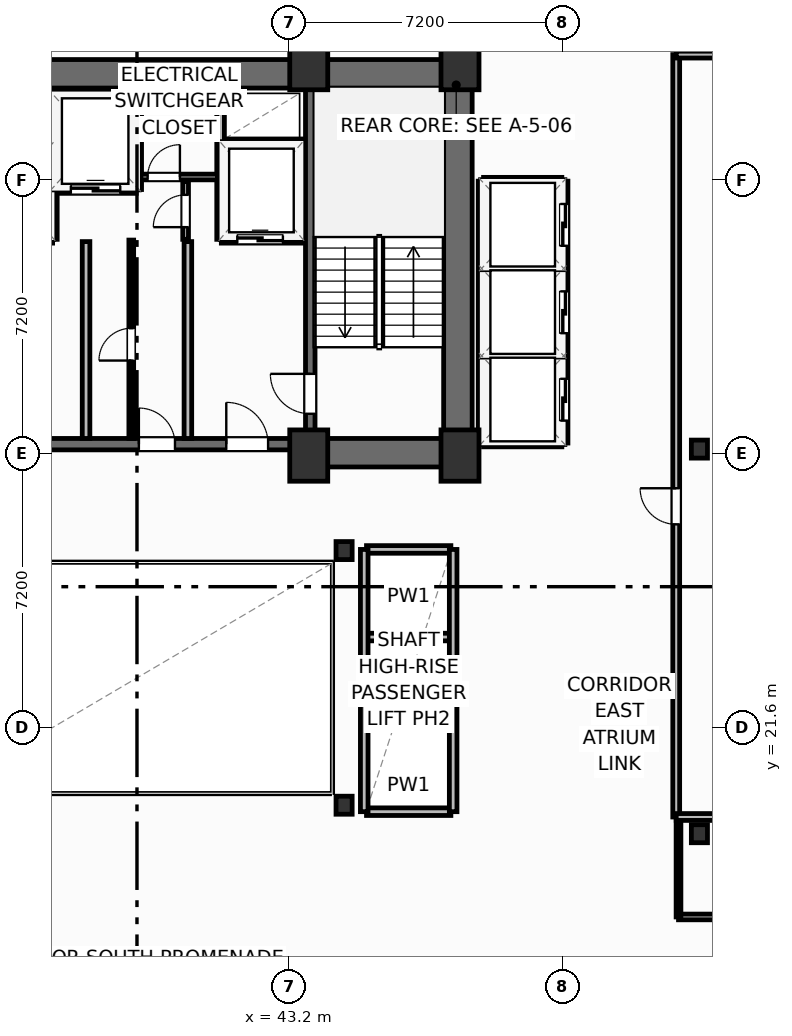
"""IFC4 building model, lengths in metres.
Left out: names, types, materials, properties, quantities, classifications, styles, units other than length and angle.
Written with IfcOpenShell. Run it as: python <this file> out.ifc"""

import sys

from ifc_helpers import new_model, si_unit, direction, frame, frame_2d, origin, origin_2d, place, context, subcontext, project, spatial, rectangle, i_section, extrude, element, fill, save


model = new_model("IFC4")
c1 = context("Model", 3, precision=1e-05, world=origin(), true_north=direction((0.0, 1.0)))
c2 = subcontext(c1, "Body", "Model", "MODEL_VIEW")
j1 = project(units=[si_unit("LENGTHUNIT", "METRE"), si_unit("PLANEANGLEUNIT", "RADIAN")], contexts=[c1])
p1 = place(None, origin())
s1 = spatial("IfcSite", under=j1, at=p1, CompositionType="ELEMENT")
p2 = place(p1, origin())
s2 = spatial("IfcBuilding", under=s1, at=p2, CompositionType="ELEMENT")
p3 = place(p2, frame((0.0, 0.0, 140.2)))
s3 = spatial("IfcBuildingStorey", under=s2, at=p3, CompositionType="ELEMENT", Elevation=140.2)
for number, where, z_axis, x_axis in (
    (1, (43.72, 28.75, 0.0), (0.0, 0.0, 1.0), (1.0, 0.0, 0.0)),
    (2, (47.7, 28.75, 0.0), (0.0, 0.0, 1.0), (1.0, 0.0, 0.0)),
    (3, (43.72, 39.05, 0.0), (0.0, 0.0, 1.0), (1.0, 0.0, 0.0)),
    (4, (47.7, 39.05, 0.0), (0.0, 0.0, 1.0), (1.0, 0.0, 0.0)),
):
    element("IfcColumn", number, at=place(p3, frame(where, z_axis=z_axis, x_axis=x_axis)), inside=s3, PredefinedType="COLUMN", context=c2, shape_type="SweptSolid", body=[
        extrude(rectangle(XDim=1.0, YDim=1.35, at=origin_2d()), origin(), (0.0, 0.0, 1.0), 3.7),
    ])
for number, where, z_axis, x_axis in (
    (5, (44.65, 19.55, 0.0), (0.0, 0.0, 1.0), (1.0, 0.0, 0.0)),
    (6, (44.65, 26.25, 0.0), (0.0, 0.0, 1.0), (1.0, 0.0, 0.0)),
    (7, (54.0, 18.8, 0.0), (0.0, 0.0, 1.0), (1.0, 0.0, 0.0)),
    (8, (54.0, 28.92, 0.0), (0.0, 0.0, 1.0), (1.0, 0.0, 0.0)),
):
    element("IfcColumn", number, at=place(p3, frame(where, z_axis=z_axis, x_axis=x_axis)), inside=s3, PredefinedType="COLUMN", context=c2, shape_type="SweptSolid", body=[
        extrude(i_section(OverallWidth=0.424, OverallDepth=0.474, WebThickness=0.048, FlangeThickness=0.077, FilletRadius=0.025, at=origin_2d()), origin(), (0.0, 0.0, 1.0), 3.7),
    ])
p4 = place(p3, frame((30.38, 38.795, 0.0), z_axis=(0.0, 0.0, 1.0), x_axis=(1.0, 0.0, 0.0)))
e9 = element("IfcWall", 9, at=p4, inside=s3, PredefinedType="SHEAR", context=c2, shape_type="SweptSolid", body=[
    extrude(rectangle(XDim=17.64, YDim=0.75, at=frame_2d((8.82, 0.0))), origin(), (0.0, 0.0, 1.0), 3.45),
])
p5 = place(p3, frame((47.645, 29.2, 0.0), z_axis=(0.0, 0.0, 1.0), x_axis=(0.0, 1.0, 0.0)))
e10 = element("IfcWall", 10, at=p5, inside=s3, PredefinedType="SHEAR", context=c2, shape_type="SweptSolid", body=[
    extrude(rectangle(XDim=9.22, YDim=0.75, at=frame_2d((4.61, 0.0))), origin(), (0.0, 0.0, 1.0), 3.45),
])
p6 = place(p3, frame((43.6, 28.825, 0.0), z_axis=(0.0, 0.0, 1.0), x_axis=(1.0, 0.0, 0.0)))
e11 = element("IfcWall", 11, at=p6, inside=s3, PredefinedType="SHEAR", context=c2, shape_type="SweptSolid", body=[
    extrude(rectangle(XDim=4.42, YDim=0.75, at=frame_2d((2.21, 0.0))), origin(), (0.0, 0.0, 1.0), 3.45),
])
p7 = place(p3, frame((34.8, 29.05, 0.0), z_axis=(0.0, 0.0, 1.0), x_axis=(1.0, 0.0, 0.0)))
e12 = element("IfcWall", 12, at=p7, inside=s3, PredefinedType="SHEAR", context=c2, shape_type="SweptSolid", body=[
    extrude(rectangle(XDim=8.8, YDim=0.3, at=frame_2d((4.4, 0.0))), origin(), (0.0, 0.0, 1.0), 3.45),
])
p8 = place(p7, frame((0.95, 0.0, 0.0)))
e13 = element("IfcOpeningElement", 13, at=p8, cuts=e12, PredefinedType="OPENING", context=c2, shape_type="SweptSolid", body=[
    extrude(rectangle(XDim=1.1, YDim=2.15, at=frame_2d((0.55, 1.075))), frame((0.0, 0.16, 0.0), z_axis=(0.0, -1.0, 0.0), x_axis=(1.0, 0.0, 0.0)), (0.0, 0.0, 1.0), 0.32),
])
p9 = place(p7, frame((6.75, 0.0, 0.0)))
e14 = element("IfcOpeningElement", 14, at=p9, cuts=e12, PredefinedType="OPENING", context=c2, shape_type="SweptSolid", body=[
    extrude(rectangle(XDim=1.1, YDim=2.15, at=frame_2d((0.55, 1.075))), frame((0.0, 0.16, 0.0), z_axis=(0.0, -1.0, 0.0), x_axis=(1.0, 0.0, 0.0)), (0.0, 0.0, 1.0), 0.32),
])
p10 = place(p7, frame((4.45, 0.0, 0.0)))
e15 = element("IfcOpeningElement", 15, at=p10, cuts=e12, PredefinedType="OPENING", context=c2, shape_type="SweptSolid", body=[
    extrude(rectangle(XDim=0.95, YDim=2.15, at=frame_2d((0.475, 1.075))), frame((0.0, 0.16, 0.0), z_axis=(0.0, -1.0, 0.0), x_axis=(1.0, 0.0, 0.0)), (0.0, 0.0, 1.0), 0.32),
])
p11 = place(p3, frame((43.76, 29.2, 0.0), z_axis=(0.0, 0.0, 1.0), x_axis=(0.0, 1.0, 0.0)))
e16 = element("IfcWall", 16, at=p11, inside=s3, PredefinedType="SHEAR", context=c2, shape_type="SweptSolid", body=[
    extrude(rectangle(XDim=9.22, YDim=0.25, at=frame_2d((4.61, 0.0))), origin(), (0.0, 0.0, 1.0), 3.45),
])
p12 = place(p11, frame((0.65, 0.0, 0.0)))
e17 = element("IfcOpeningElement", 17, at=p12, cuts=e16, PredefinedType="OPENING", context=c2, shape_type="SweptSolid", body=[
    extrude(rectangle(XDim=1.05, YDim=2.15, at=frame_2d((0.525, 1.075))), frame((0.0, 0.135, 0.0), z_axis=(0.0, -1.0, 0.0), x_axis=(1.0, 0.0, 0.0)), (0.0, 0.0, 1.0), 0.27),
])
p13 = place(p3, frame((53.45, 16.61, 0.0), z_axis=(0.0, 0.0, 1.0), x_axis=(1.0, 0.0, 0.0)))
e18 = element("IfcWall", 18, at=p13, inside=s3, PredefinedType="PARTITIONING", context=c2, shape_type="SweptSolid", body=[
    extrude(rectangle(XDim=16.55, YDim=0.15, at=frame_2d((8.275, 0.0))), origin(), (0.0, 0.0, 1.0), 3.45),
])
p14 = place(p13, frame((5.873, 0.0, 0.0)))
e19 = element("IfcOpeningElement", 19, at=p14, cuts=e18, PredefinedType="OPENING", context=c2, shape_type="SweptSolid", body=[
    extrude(rectangle(XDim=0.92, YDim=2.05, at=frame_2d((0.46, 1.025))), frame((0.0, 0.085, 0.0), z_axis=(0.0, -1.0, 0.0), x_axis=(1.0, 0.0, 0.0)), (0.0, 0.0, 1.0), 0.17),
])
p15 = place(p3, frame((53.45, 16.61, 0.0), z_axis=(0.0, 0.0, 1.0), x_axis=(0.0, 1.0, 0.0)))
e20 = element("IfcWall", 20, at=p15, inside=s3, PredefinedType="PARTITIONING", context=c2, shape_type="SweptSolid", body=[
    extrude(rectangle(XDim=2.63, YDim=0.125, at=frame_2d((1.315, 0.0))), origin(), (0.0, 0.0, 1.0), 3.45),
])
p16 = place(p3, frame((53.39, 19.24, 0.0), z_axis=(0.0, 0.0, 1.0), x_axis=(0.0, 1.0, 0.0)))
e21 = element("IfcWall", 21, at=p16, inside=s3, PredefinedType="PARTITIONING", context=c2, shape_type="SweptSolid", body=[
    extrude(rectangle(XDim=20.06, YDim=0.18, at=frame_2d((10.03, 0.0))), origin(), (0.0, 0.0, 1.0), 3.45),
])
p17 = place(p16, frame((7.7, 0.0, 0.0)))
e22 = element("IfcOpeningElement", 22, at=p17, cuts=e21, PredefinedType="OPENING", context=c2, shape_type="SweptSolid", body=[
    extrude(rectangle(XDim=0.95, YDim=2.05, at=frame_2d((0.475, 1.025))), frame((0.0, 0.1, 0.0), z_axis=(0.0, -1.0, 0.0), x_axis=(1.0, 0.0, 0.0)), (0.0, 0.0, 1.0), 0.2),
])
p18 = place(p3, frame((53.39, 19.24, 0.0), z_axis=(0.0, 0.0, 1.0), x_axis=(1.0, 0.0, 0.0)))
e23 = element("IfcWall", 23, at=p18, inside=s3, PredefinedType="PARTITIONING", context=c2, shape_type="SweptSolid", body=[
    extrude(rectangle(XDim=22.367, YDim=0.18, at=frame_2d((11.183, 0.0))), origin(), (0.0, 0.0, 1.0), 2.662),
])
p19 = place(p3, frame((53.39, 39.3, 0.0), z_axis=(0.0, 0.0, 1.0), x_axis=(1.0, 0.0, 0.0)))
e24 = element("IfcWall", 24, at=p19, inside=s3, PredefinedType="PARTITIONING", context=c2, shape_type="SweptSolid", body=[
    extrude(rectangle(XDim=24.74, YDim=0.18, at=frame_2d((12.37, 0.0))), origin(), (0.0, 0.0, 1.0), 3.45),
])
for number, where, z_axis, x_axis in (
    (25, (37.86, 29.2, 0.0), (0.0, 0.0, 1.0), (0.0, 1.0, 0.0)),
    (26, (40.54, 29.2, 0.0), (0.0, 0.0, 1.0), (0.0, 1.0, 0.0)),
):
    element("IfcWall", number, at=place(p3, frame(where, z_axis=z_axis, x_axis=x_axis)), inside=s3, PredefinedType="PARTITIONING", context=c2, shape_type="SweptSolid", body=[
        extrude(rectangle(XDim=5.18, YDim=0.2, at=frame_2d((2.59, 0.0))), origin(), (0.0, 0.0, 1.0), 3.45),
    ])
p20 = place(p3, frame((37.0, 34.44, 0.0), z_axis=(0.0, 0.0, 1.0), x_axis=(0.0, 1.0, 0.0)))
e27 = element("IfcWall", 27, at=p20, inside=s3, PredefinedType="PARTITIONING", context=c2, shape_type="SweptSolid", body=[
    extrude(rectangle(XDim=3.9, YDim=0.2, at=frame_2d((1.95, 0.0))), origin(), (0.0, 0.0, 1.0), 3.45),
])
p21 = place(p3, frame((41.42, 34.44, 0.0), z_axis=(0.0, 0.0, 1.0), x_axis=(1.0, 0.0, 0.0)))
e28 = element("IfcWall", 28, at=p21, inside=s3, PredefinedType="PARTITIONING", context=c2, shape_type="SweptSolid", body=[
    extrude(rectangle(XDim=2.18, YDim=0.2, at=frame_2d((1.09, 0.0))), origin(), (0.0, 0.0, 1.0), 3.45),
])
p22 = place(p21, frame((0.42, 0.0, 0.0)))
e29 = element("IfcOpeningElement", 29, at=p22, cuts=e28, PredefinedType="OPENING", context=c2, shape_type="SweptSolid", body=[
    extrude(rectangle(XDim=1.2, YDim=2.2, at=frame_2d((0.6, 1.1))), frame((0.0, 0.11, 0.0), z_axis=(0.0, -1.0, 0.0), x_axis=(1.0, 0.0, 0.0)), (0.0, 0.0, 1.0), 0.22),
])
p23 = place(p3, frame((41.42, 36.98, 0.0), z_axis=(0.0, 0.0, 1.0), x_axis=(1.0, 0.0, 0.0)))
e30 = element("IfcWall", 30, at=p23, inside=s3, PredefinedType="PARTITIONING", context=c2, shape_type="SweptSolid", body=[
    extrude(rectangle(XDim=2.18, YDim=0.2, at=frame_2d((1.09, 0.0))), origin(), (0.0, 0.0, 1.0), 3.45),
])
p24 = place(p3, frame((41.4, 34.44, 0.0), z_axis=(0.0, 0.0, 1.0), x_axis=(0.0, 1.0, 0.0)))
e31 = element("IfcWall", 31, at=p24, inside=s3, PredefinedType="PARTITIONING", context=c2, shape_type="SweptSolid", body=[
    extrude(rectangle(XDim=3.9, YDim=0.2, at=frame_2d((1.95, 0.0))), origin(), (0.0, 0.0, 1.0), 3.45),
])
p25 = place(p3, frame((37.06, 35.75, 0.0), z_axis=(0.0, 0.0, 1.0), x_axis=(1.0, 0.0, 0.0)))
e32 = element("IfcWall", 32, at=p25, inside=s3, PredefinedType="PARTITIONING", context=c2, shape_type="SweptSolid", body=[
    extrude(rectangle(XDim=2.12, YDim=0.2, at=frame_2d((1.06, 0.0))), origin(), (0.0, 0.0, 1.0), 3.45),
])
p26 = place(p25, frame((0.4, 0.0, 0.0)))
e33 = element("IfcOpeningElement", 33, at=p26, cuts=e32, PredefinedType="OPENING", context=c2, shape_type="SweptSolid", body=[
    extrude(rectangle(XDim=1.3, YDim=2.2, at=frame_2d((0.65, 1.1))), frame((0.0, 0.11, 0.0), z_axis=(0.0, -1.0, 0.0), x_axis=(1.0, 0.0, 0.0)), (0.0, 0.0, 1.0), 0.22),
])
p27 = place(p3, frame((39.22, 35.75, 0.0), z_axis=(0.0, 0.0, 1.0), x_axis=(0.0, 1.0, 0.0)))
e34 = element("IfcWall", 34, at=p27, inside=s3, PredefinedType="PARTITIONING", context=c2, shape_type="SweptSolid", body=[
    extrude(rectangle(XDim=2.59, YDim=0.2, at=frame_2d((1.295, 0.0))), origin(), (0.0, 0.0, 1.0), 3.45),
])
p28 = place(p3, frame((39.3, 36.08, 0.0), z_axis=(0.0, 0.0, 1.0), x_axis=(1.0, 0.0, 0.0)))
e35 = element("IfcWall", 35, at=p28, inside=s3, PredefinedType="PARTITIONING", context=c2, shape_type="SweptSolid", body=[
    extrude(rectangle(XDim=2.02, YDim=0.15, at=frame_2d((1.01, 0.0))), origin(), (0.0, 0.0, 1.0), 3.45),
])
p29 = place(p28, frame((0.18, 0.0, 0.0)))
e36 = element("IfcOpeningElement", 36, at=p29, cuts=e35, PredefinedType="OPENING", context=c2, shape_type="SweptSolid", body=[
    extrude(rectangle(XDim=0.85, YDim=2.05, at=frame_2d((0.425, 1.025))), frame((0.0, 0.085, 0.0), z_axis=(0.0, -1.0, 0.0), x_axis=(1.0, 0.0, 0.0)), (0.0, 0.0, 1.0), 0.17),
])
p30 = place(p3, frame((40.48, 34.44, 0.0), z_axis=(0.0, 0.0, 1.0), x_axis=(0.0, 1.0, 0.0)))
e37 = element("IfcWall", 37, at=p30, inside=s3, PredefinedType="PARTITIONING", context=c2, shape_type="SweptSolid", body=[
    extrude(rectangle(XDim=1.52, YDim=0.15, at=frame_2d((0.76, 0.0))), origin(), (0.0, 0.0, 1.0), 3.45),
])
p31 = place(p30, frame((0.32, 0.0, 0.0)))
e38 = element("IfcOpeningElement", 38, at=p31, cuts=e37, PredefinedType="OPENING", context=c2, shape_type="SweptSolid", body=[
    extrude(rectangle(XDim=0.85, YDim=2.05, at=frame_2d((0.425, 1.025))), frame((0.0, 0.085, 0.0), z_axis=(0.0, -1.0, 0.0), x_axis=(1.0, 0.0, 0.0)), (0.0, 0.0, 1.0), 0.17),
])
p32 = place(p3, frame((39.05, 29.2, 0.0), z_axis=(0.0, 0.0, 1.0), x_axis=(0.0, 1.0, 0.0)))
e39 = element("IfcWall", 39, at=p32, inside=s3, PredefinedType="PARTITIONING", context=c2, shape_type="SweptSolid", body=[
    extrude(rectangle(XDim=5.22, YDim=0.125, at=frame_2d((2.61, 0.0))), origin(), (0.0, 0.0, 1.0), 3.45),
])
p33 = place(p32, frame((2.05, 0.0, 0.0)))
e40 = element("IfcOpeningElement", 40, at=p33, cuts=e39, PredefinedType="OPENING", context=c2, shape_type="SweptSolid", body=[
    extrude(rectangle(XDim=0.85, YDim=2.05, at=frame_2d((0.425, 1.025))), frame((0.0, 0.073, 0.0), z_axis=(0.0, -1.0, 0.0), x_axis=(1.0, 0.0, 0.0)), (0.0, 0.0, 1.0), 0.145),
])
for number, where, z_axis, x_axis in (
    (41, (48.32, 31.375, 0.0), (0.0, 0.0, 1.0), (1.0, 0.0, 0.0)),
    (42, (48.32, 33.675, 0.0), (0.0, 0.0, 1.0), (1.0, 0.0, 0.0)),
):
    element("IfcWall", number, at=place(p3, frame(where, z_axis=z_axis, x_axis=x_axis)), inside=s3, PredefinedType="PARTITIONING", context=c2, shape_type="SweptSolid", body=[
        extrude(rectangle(XDim=2.06, YDim=0.2, at=frame_2d((1.03, 0.0))), origin(), (0.0, 0.0, 1.0), 3.45),
    ])
p34 = place(p3, frame((48.32, 29.08, 0.0), z_axis=(0.0, 0.0, 1.0), x_axis=(1.0, 0.0, 0.0)))
e43 = element("IfcWall", 43, at=p34, inside=s3, PredefinedType="PARTITIONING", context=c2, shape_type="SweptSolid", body=[
    extrude(rectangle(XDim=2.06, YDim=0.2, at=frame_2d((1.03, 0.0))), origin(), (0.0, 0.0, 1.0), 2.662),
])
p35 = place(p3, frame((48.32, 35.97, 0.0), z_axis=(0.0, 0.0, 1.0), x_axis=(1.0, 0.0, 0.0)))
e44 = element("IfcWall", 44, at=p35, inside=s3, PredefinedType="PARTITIONING", context=c2, shape_type="SweptSolid", body=[
    extrude(rectangle(XDim=2.06, YDim=0.2, at=frame_2d((1.03, 0.0))), origin(), (0.0, 0.0, 1.0), 3.45),
])
p36 = place(p3, frame((48.28, 29.08, 0.0), z_axis=(0.0, 0.0, 1.0), x_axis=(0.0, 1.0, 0.0)))
e45 = element("IfcWall", 45, at=p36, inside=s3, PredefinedType="PARTITIONING", context=c2, shape_type="SweptSolid", body=[
    extrude(rectangle(XDim=6.89, YDim=0.2, at=frame_2d((3.445, 0.0))), origin(), (0.0, 0.0, 1.0), 3.45),
])
p37 = place(p3, frame((50.44, 29.08, 0.0), z_axis=(0.0, 0.0, 1.0), x_axis=(0.0, 1.0, 0.0)))
e46 = element("IfcWall", 46, at=p37, inside=s3, PredefinedType="PARTITIONING", context=c2, shape_type="SweptSolid", body=[
    extrude(rectangle(XDim=6.89, YDim=0.2, at=frame_2d((3.445, 0.0))), origin(), (0.0, 0.0, 1.0), 3.45),
])
p38 = place(p37, frame((0.59, 0.0, 0.0)))
e47 = element("IfcOpeningElement", 47, at=p38, cuts=e46, PredefinedType="OPENING", context=c2, shape_type="SweptSolid", body=[
    extrude(rectangle(XDim=1.1, YDim=2.15, at=frame_2d((0.55, 1.075))), frame((0.0, 0.11, 0.0), z_axis=(0.0, -1.0, 0.0), x_axis=(1.0, 0.0, 0.0)), (0.0, 0.0, 1.0), 0.22),
])
p39 = place(p37, frame((2.89, 0.0, 0.0)))
e48 = element("IfcOpeningElement", 48, at=p39, cuts=e46, PredefinedType="OPENING", context=c2, shape_type="SweptSolid", body=[
    extrude(rectangle(XDim=1.1, YDim=2.15, at=frame_2d((0.55, 1.075))), frame((0.0, 0.11, 0.0), z_axis=(0.0, -1.0, 0.0), x_axis=(1.0, 0.0, 0.0)), (0.0, 0.0, 1.0), 0.22),
])
p40 = place(p37, frame((5.19, 0.0, 0.0)))
e49 = element("IfcOpeningElement", 49, at=p40, cuts=e46, PredefinedType="OPENING", context=c2, shape_type="SweptSolid", body=[
    extrude(rectangle(XDim=1.1, YDim=2.15, at=frame_2d((0.55, 1.075))), frame((0.0, 0.11, 0.0), z_axis=(0.0, -1.0, 0.0), x_axis=(1.0, 0.0, 0.0)), (0.0, 0.0, 1.0), 0.22),
])
for number, where, z_axis, x_axis in (
    (50, (45.24, 21.675, 0.0), (0.0, 0.0, 1.0), (1.0, 0.0, 0.0)),
    (51, (45.24, 23.975, 0.0), (0.0, 0.0, 1.0), (1.0, 0.0, 0.0)),
):
    element("IfcWall", number, at=place(p3, frame(where, z_axis=z_axis, x_axis=x_axis)), inside=s3, PredefinedType="PARTITIONING", context=c2, shape_type="SweptSolid", body=[
        extrude(rectangle(XDim=2.22, YDim=0.2, at=frame_2d((1.11, 0.0))), origin(), (0.0, 0.0, 1.0), 3.45),
    ])
p41 = place(p3, frame((45.24, 19.38, 0.0), z_axis=(0.0, 0.0, 1.0), x_axis=(1.0, 0.0, 0.0)))
e52 = element("IfcWall", 52, at=p41, inside=s3, PredefinedType="PARTITIONING", context=c2, shape_type="SweptSolid", body=[
    extrude(rectangle(XDim=2.22, YDim=0.2, at=frame_2d((1.11, 0.0))), origin(), (0.0, 0.0, 1.0), 2.662),
])
p42 = place(p3, frame((45.24, 26.28, 0.0), z_axis=(0.0, 0.0, 1.0), x_axis=(1.0, 0.0, 0.0)))
e53 = element("IfcWall", 53, at=p42, inside=s3, PredefinedType="PARTITIONING", context=c2, shape_type="SweptSolid", body=[
    extrude(rectangle(XDim=2.22, YDim=0.2, at=frame_2d((1.11, 0.0))), origin(), (0.0, 0.0, 1.0), 3.45),
])
for number, where, z_axis, x_axis in (
    (54, (45.18, 19.38, 0.0), (0.0, 0.0, 1.0), (0.0, 1.0, 0.0)),
    (55, (47.52, 19.38, 0.0), (0.0, 0.0, 1.0), (0.0, 1.0, 0.0)),
):
    element("IfcWall", number, at=place(p3, frame(where, z_axis=z_axis, x_axis=x_axis)), inside=s3, PredefinedType="PARTITIONING", context=c2, shape_type="SweptSolid", body=[
        extrude(rectangle(XDim=6.9, YDim=0.2, at=frame_2d((3.45, 0.0))), origin(), (0.0, 0.0, 1.0), 3.45),
    ])
p43 = place(p17, origin())
e56 = element("IfcDoor", 56, at=p43, inside=s3, OperationType="SINGLE_SWING_RIGHT", PredefinedType="DOOR", context=c2, shape_type="SweptSolid", body=[
    extrude(rectangle(XDim=0.95, YDim=2.05, at=frame_2d((0.475, 1.025))), frame((0.0, 0.025, 0.0), z_axis=(0.0, -1.0, 0.0), x_axis=(1.0, 0.0, 0.0)), (0.0, 0.0, 1.0), 0.05),
])
fill(e22, e56)
p44 = place(p12, origin())
e57 = element("IfcDoor", 57, at=p44, inside=s3, OperationType="SINGLE_SWING_RIGHT", PredefinedType="DOOR", context=c2, shape_type="SweptSolid", body=[
    extrude(rectangle(XDim=1.05, YDim=2.15, at=frame_2d((0.525, 1.075))), frame((0.0, 0.025, 0.0), z_axis=(0.0, -1.0, 0.0), x_axis=(1.0, 0.0, 0.0)), (0.0, 0.0, 1.0), 0.05),
])
fill(e17, e57)
p45 = place(p9, origin())
e58 = element("IfcDoor", 58, at=p45, inside=s3, OperationType="SINGLE_SWING_LEFT", PredefinedType="DOOR", context=c2, shape_type="SweptSolid", body=[
    extrude(rectangle(XDim=1.1, YDim=2.15, at=frame_2d((0.55, 1.075))), frame((0.0, 0.025, 0.0), z_axis=(0.0, -1.0, 0.0), x_axis=(1.0, 0.0, 0.0)), (0.0, 0.0, 1.0), 0.05),
])
fill(e14, e58)
p46 = place(p22, origin())
e59 = element("IfcDoor", 59, at=p46, inside=s3, OperationType="SLIDING_TO_LEFT", PredefinedType="DOOR", context=c2, shape_type="SweptSolid", body=[
    extrude(rectangle(XDim=1.2, YDim=2.2, at=frame_2d((0.6, 1.1))), frame((0.0, 0.025, 0.0), z_axis=(0.0, -1.0, 0.0), x_axis=(1.0, 0.0, 0.0)), (0.0, 0.0, 1.0), 0.05),
])
fill(e29, e59)
p47 = place(p26, origin())
e60 = element("IfcDoor", 60, at=p47, inside=s3, OperationType="SLIDING_TO_LEFT", PredefinedType="DOOR", context=c2, shape_type="SweptSolid", body=[
    extrude(rectangle(XDim=1.3, YDim=2.2, at=frame_2d((0.65, 1.1))), frame((0.0, 0.025, 0.0), z_axis=(0.0, -1.0, 0.0), x_axis=(1.0, 0.0, 0.0)), (0.0, 0.0, 1.0), 0.05),
])
fill(e33, e60)
p48 = place(p29, origin())
e61 = element("IfcDoor", 61, at=p48, inside=s3, OperationType="SINGLE_SWING_RIGHT", PredefinedType="DOOR", context=c2, shape_type="SweptSolid", body=[
    extrude(rectangle(XDim=0.85, YDim=2.05, at=frame_2d((0.425, 1.025))), frame((0.0, 0.025, 0.0), z_axis=(0.0, -1.0, 0.0), x_axis=(1.0, 0.0, 0.0)), (0.0, 0.0, 1.0), 0.05),
])
fill(e36, e61)
p49 = place(p31, origin())
e62 = element("IfcDoor", 62, at=p49, inside=s3, OperationType="SINGLE_SWING_LEFT", PredefinedType="DOOR", context=c2, shape_type="SweptSolid", body=[
    extrude(rectangle(XDim=0.85, YDim=2.05, at=frame_2d((0.425, 1.025))), frame((0.0, 0.025, 0.0), z_axis=(0.0, -1.0, 0.0), x_axis=(1.0, 0.0, 0.0)), (0.0, 0.0, 1.0), 0.05),
])
fill(e38, e62)
p50 = place(p33, origin())
e63 = element("IfcDoor", 63, at=p50, inside=s3, OperationType="SINGLE_SWING_LEFT", PredefinedType="DOOR", context=c2, shape_type="SweptSolid", body=[
    extrude(rectangle(XDim=0.85, YDim=2.05, at=frame_2d((0.425, 1.025))), frame((0.0, 0.025, 0.0), z_axis=(0.0, -1.0, 0.0), x_axis=(1.0, 0.0, 0.0)), (0.0, 0.0, 1.0), 0.05),
])
fill(e40, e63)
p51 = place(p10, origin())
e64 = element("IfcDoor", 64, at=p51, inside=s3, OperationType="SINGLE_SWING_LEFT", PredefinedType="DOOR", context=c2, shape_type="SweptSolid", body=[
    extrude(rectangle(XDim=0.95, YDim=2.15, at=frame_2d((0.475, 1.075))), frame((0.0, 0.025, 0.0), z_axis=(0.0, -1.0, 0.0), x_axis=(1.0, 0.0, 0.0)), (0.0, 0.0, 1.0), 0.05),
])
fill(e15, e64)
p52 = place(p38, origin())
e65 = element("IfcDoor", 65, at=p52, inside=s3, OperationType="SLIDING_TO_LEFT", PredefinedType="DOOR", context=c2, shape_type="SweptSolid", body=[
    extrude(rectangle(XDim=1.1, YDim=2.15, at=frame_2d((0.55, 1.075))), frame((0.0, 0.025, 0.0), z_axis=(0.0, -1.0, 0.0), x_axis=(1.0, 0.0, 0.0)), (0.0, 0.0, 1.0), 0.05),
])
fill(e47, e65)
p53 = place(p39, origin())
e66 = element("IfcDoor", 66, at=p53, inside=s3, OperationType="SLIDING_TO_LEFT", PredefinedType="DOOR", context=c2, shape_type="SweptSolid", body=[
    extrude(rectangle(XDim=1.1, YDim=2.15, at=frame_2d((0.55, 1.075))), frame((0.0, 0.025, 0.0), z_axis=(0.0, -1.0, 0.0), x_axis=(1.0, 0.0, 0.0)), (0.0, 0.0, 1.0), 0.05),
])
fill(e48, e66)
p54 = place(p40, origin())
e67 = element("IfcDoor", 67, at=p54, inside=s3, OperationType="SLIDING_TO_LEFT", PredefinedType="DOOR", context=c2, shape_type="SweptSolid", body=[
    extrude(rectangle(XDim=1.1, YDim=2.15, at=frame_2d((0.55, 1.075))), frame((0.0, 0.025, 0.0), z_axis=(0.0, -1.0, 0.0), x_axis=(1.0, 0.0, 0.0)), (0.0, 0.0, 1.0), 0.05),
])
fill(e49, e67)
save(model, sys.argv[1])
